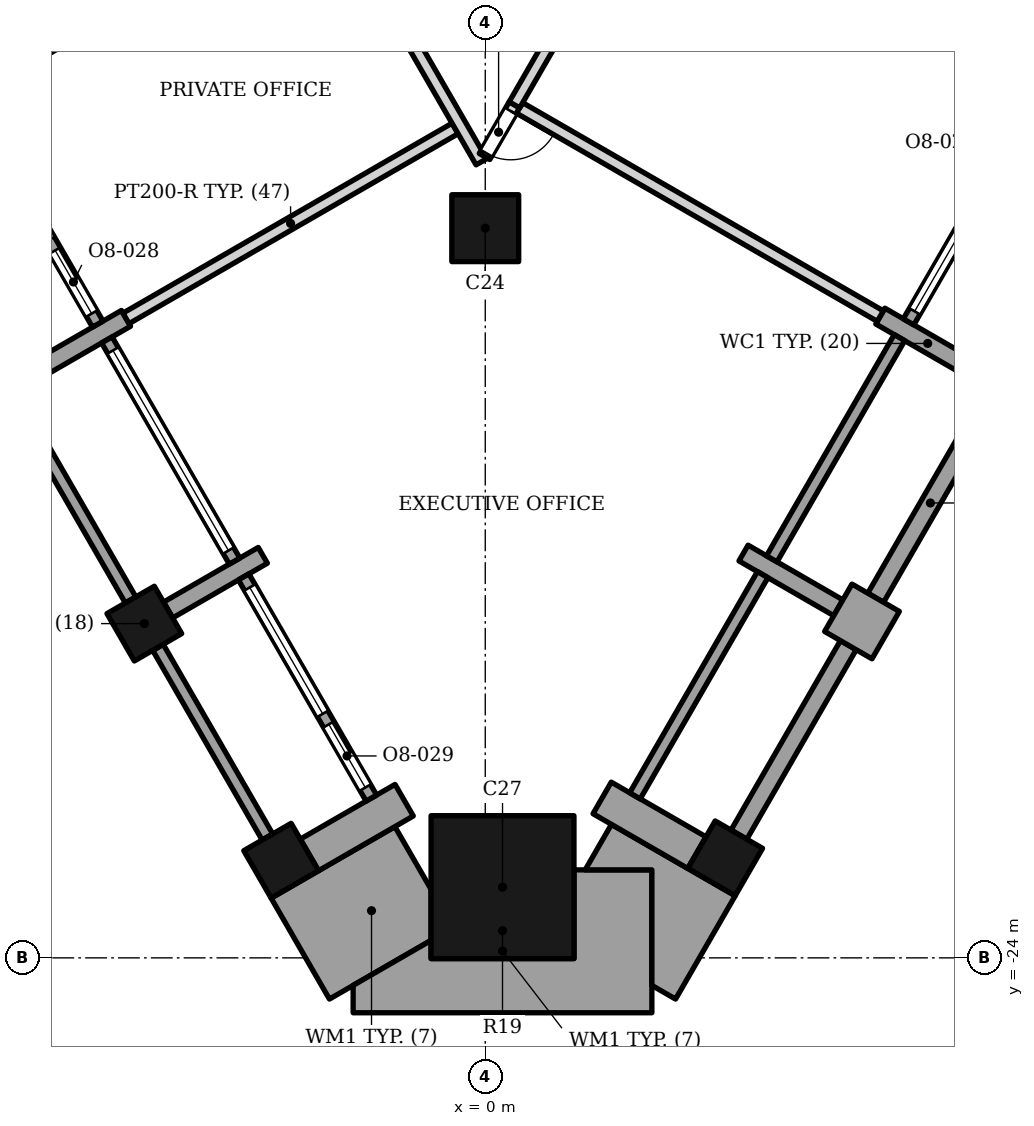
"""IFC4 building model, lengths in metres.
Left out: names, types, materials, properties, quantities, classifications, styles, units other than length and angle.
Written with IfcOpenShell. Run it as: python <this file> out.ifc"""

import sys

from ifc_helpers import new_model, si_unit, direction, frame, frame_2d, origin, origin_2d, place, context, subcontext, project, spatial, polyline, rectangle, outline, extrude, element, fill, save


model = new_model("IFC4")
c1 = context("Model", 3, precision=1e-05, world=origin(), true_north=direction((0.0, 1.0)))
c2 = subcontext(c1, "Body", "Model", "MODEL_VIEW")
j1 = project(units=[si_unit("LENGTHUNIT", "METRE"), si_unit("PLANEANGLEUNIT", "RADIAN")], contexts=[c1])
p1 = place(None, origin())
s1 = spatial("IfcSite", under=j1, at=p1, CompositionType="ELEMENT")
p2 = place(p1, origin())
s2 = spatial("IfcBuilding", under=s1, at=p2, CompositionType="ELEMENT")
p3 = place(p2, frame((0.0, 0.0, 231.5)))
s3 = spatial("IfcBuildingStorey", under=s2, at=p3, CompositionType="ELEMENT", Elevation=231.5)
p4 = place(p3, frame((0.284, -22.837, 0.0), z_axis=(0.0, 0.0, 1.0), x_axis=(0.0, 1.0, 0.0)))
e1 = element("IfcColumn", 1, at=p4, inside=s3, PredefinedType="COLUMN", context=c2, shape_type="SweptSolid", body=[
    extrude(rectangle(XDim=2.35, YDim=2.35, at=origin_2d()), origin(), (0.0, 0.0, 1.0), 3.9),
])
p5 = place(p3, frame((0.0, -12.0, 0.0), z_axis=(0.0, 0.0, 1.0), x_axis=(1.0, 0.0, 0.0)))
e2 = element("IfcColumn", 2, at=p5, inside=s3, PredefinedType="COLUMN", context=c2, shape_type="SweptSolid", body=[
    extrude(rectangle(XDim=1.1, YDim=1.1, at=origin_2d()), origin(), (0.0, 0.0, 1.0), 3.9),
])
for number, where, z_axis, x_axis in (
    (3, (-5.607, -18.503, 0.0), (0.0, 0.0, 1.0), (0.5, -0.866, 0.0)),
    (4, (-3.357, -22.402, 0.0), (0.0, 0.0, 1.0), (0.5, -0.866, 0.0)),
    (5, (3.946, -22.363, 0.0), (0.0, 0.0, 1.0), (0.5, 0.866, 0.0)),
):
    element("IfcColumn", number, at=place(p3, frame(where, z_axis=z_axis, x_axis=x_axis)), inside=s3, PredefinedType="COLUMN", context=c2, shape_type="SweptSolid", body=[
        extrude(rectangle(XDim=0.9, YDim=0.9, at=origin_2d()), origin(), (0.0, 0.0, 1.0), 3.9),
    ])
p6 = place(p3, frame((-7.467, -14.383, 0.0), z_axis=(0.0, 0.0, 1.0), x_axis=(0.865989075817, 0.500062916607, 0.0)))
e6 = element("IfcWall", 6, at=p6, inside=s3, PredefinedType="SOLIDWALL", context=c2, shape_type="SweptSolid", body=[
    extrude(rectangle(XDim=1.8, YDim=0.3, at=frame_2d((0.9, 0.0))), origin(), (0.0, 0.0, 1.0), 3.0),
])
p7 = place(p3, frame((-3.658, -17.38, 0.0), z_axis=(0.0, 0.0, 1.0), x_axis=(-0.866029639064, -0.499992664208, 0.0)))
e7 = element("IfcWall", 7, at=p7, inside=s3, PredefinedType="SOLIDWALL", context=c2, shape_type="SweptSolid", body=[
    extrude(rectangle(XDim=1.799, YDim=0.3, at=frame_2d((0.899, 0.0))), origin(), (0.0, 0.0, 1.0), 3.0),
])
p8 = place(p3, frame((-1.333, -21.407, 0.0), z_axis=(0.0, 0.0, 1.0), x_axis=(-0.866047807691, -0.499961193289, 0.0)))
e8 = element("IfcWall", 8, at=p8, inside=s3, PredefinedType="SOLIDWALL", context=c2, shape_type="SweptSolid", body=[
    extrude(rectangle(XDim=1.8, YDim=0.6, at=frame_2d((0.9, 0.0))), origin(), (0.0, 0.0, 1.0), 3.0),
])
p9 = place(p3, frame((-8.473, -9.941, 0.0), z_axis=(0.0, 0.0, 1.0), x_axis=(0.500027713859, -0.866009402589, 0.0)))
e9 = element("IfcWall", 9, at=p9, inside=s3, PredefinedType="ELEMENTEDWALL", context=c2, shape_type="SweptSolid", body=[
    extrude(rectangle(XDim=4.2, YDim=0.2, at=frame_2d((2.1, 0.0))), origin(), (0.0, 0.0, 1.0), 2.95),
])
p10 = place(p9, frame((0.2, 0.0, 0.45)))
e10 = element("IfcOpeningElement", 10, at=p10, cuts=e9, PredefinedType="OPENING", context=c2, shape_type="SweptSolid", body=[
    extrude(rectangle(XDim=2.4, YDim=2.25, at=frame_2d((1.2, 1.125))), frame((0.0, 0.11, 0.0), z_axis=(0.0, -1.0, 0.0), x_axis=(1.0, 0.0, 0.0)), (0.0, 0.0, 1.0), 0.22),
])
p11 = place(p9, frame((2.8, 0.0, 0.0)))
e11 = element("IfcOpeningElement", 11, at=p11, cuts=e9, PredefinedType="OPENING", context=c2, shape_type="SweptSolid", body=[
    extrude(rectangle(XDim=1.2, YDim=2.7, at=frame_2d((0.6, 1.35))), frame((0.0, 0.11, 0.0), z_axis=(0.0, -1.0, 0.0), x_axis=(1.0, 0.0, 0.0)), (0.0, 0.0, 1.0), 0.22),
])
p12 = place(p3, origin())
e12 = element("IfcWall", 12, at=p12, inside=s3, PredefinedType="SOLIDWALL", context=c2, shape_type="SweptSolid", body=[
    extrude(outline(polyline([(-7.719, -15.048), (-5.919, -18.164), (-5.746, -18.064), (-7.545, -14.948), (-7.719, -15.048)])), origin(), (0.0, 0.0, 1.0), 3.0),
])
p13 = place(p3, frame((-6.223, -13.838, 0.0), z_axis=(0.0, 0.0, 1.0), x_axis=(0.500002543286, -0.866023935413, 0.0)))
e13 = element("IfcWall", 13, at=p13, inside=s3, PredefinedType="ELEMENTEDWALL", context=c2, shape_type="SweptSolid", body=[
    extrude(rectangle(XDim=4.2, YDim=0.2, at=frame_2d((2.1, 0.0))), origin(), (0.0, 0.0, 1.0), 3.0),
])
p14 = place(p13, frame((0.2, 0.0, 0.45)))
e14 = element("IfcOpeningElement", 14, at=p14, cuts=e13, PredefinedType="OPENING", context=c2, shape_type="SweptSolid", body=[
    extrude(rectangle(XDim=3.8, YDim=2.25, at=frame_2d((1.9, 1.125))), frame((0.0, 0.11, 0.0), z_axis=(0.0, -1.0, 0.0), x_axis=(1.0, 0.0, 0.0)), (0.0, 0.0, 1.0), 0.22),
])
p15 = place(p3, frame((-5.382, -18.895, 0.0), z_axis=(0.0, 0.0, 1.0), x_axis=(0.500012057535, -0.866018442252, 0.0)))
e15 = element("IfcWall", 15, at=p15, inside=s3, PredefinedType="SOLIDWALL", context=c2, shape_type="SweptSolid", body=[
    extrude(rectangle(XDim=3.6, YDim=0.2, at=frame_2d((1.8, 0.0))), origin(), (0.0, 0.0, 1.0), 3.0),
])
p16 = place(p3, frame((-3.973, -17.735, 0.0), z_axis=(0.0, 0.0, 1.0), x_axis=(0.500027713859, -0.866009402589, 0.0)))
e16 = element("IfcWall", 16, at=p16, inside=s3, PredefinedType="ELEMENTEDWALL", context=c2, shape_type="SweptSolid", body=[
    extrude(rectangle(XDim=4.2, YDim=0.2, at=frame_2d((2.1, 0.0))), origin(), (0.0, 0.0, 1.0), 3.0),
])
p17 = place(p16, frame((0.2, 0.0, 0.45)))
e17 = element("IfcOpeningElement", 17, at=p17, cuts=e16, PredefinedType="OPENING", context=c2, shape_type="SweptSolid", body=[
    extrude(rectangle(XDim=2.4, YDim=2.25, at=frame_2d((1.2, 1.125))), frame((0.0, 0.11, 0.0), z_axis=(0.0, -1.0, 0.0), x_axis=(1.0, 0.0, 0.0)), (0.0, 0.0, 1.0), 0.22),
])
p18 = place(p16, frame((2.8, 0.0, 0.0)))
e18 = element("IfcOpeningElement", 18, at=p18, cuts=e16, PredefinedType="OPENING", context=c2, shape_type="SweptSolid", body=[
    extrude(rectangle(XDim=1.2, YDim=2.7, at=frame_2d((0.6, 1.35))), frame((0.0, 0.11, 0.0), z_axis=(0.0, -1.0, 0.0), x_axis=(1.0, 0.0, 0.0)), (0.0, 0.0, 1.0), 0.22),
])
p19 = place(p3, frame((3.481, -22.27, 0.0), z_axis=(0.0, 0.0, 1.0), x_axis=(-0.865989075817, 0.500062916607, 0.0)))
e19 = element("IfcWall", 19, at=p19, inside=s3, PredefinedType="SOLIDWALL", context=c2, shape_type="SweptSolid", body=[
    extrude(rectangle(XDim=1.8, YDim=0.6, at=frame_2d((0.9, 0.0))), origin(), (0.0, 0.0, 1.0), 3.0),
])
p20 = place(p3, frame((5.971, -18.857, 0.0), z_axis=(0.0, 0.0, 1.0), x_axis=(0.499902469156, 0.866081705922, 0.0)))
e20 = element("IfcWall", 20, at=p20, inside=s3, PredefinedType="SOLIDWALL", context=c2, shape_type="SweptSolid", body=[
    extrude(rectangle(XDim=0.9, YDim=0.9, at=frame_2d((0.45, 0.0))), origin(), (0.0, 0.0, 1.0), 3.0),
])
for number, where, z_axis, x_axis in (
    (21, (4.248, -17.343, 0.0), (0.0, 0.0, 1.0), (0.866, -0.5, 0.0)),
    (22, (8.056, -14.345, 0.0), (0.0, 0.0, 1.0), (-0.866, 0.5, 0.0)),
):
    element("IfcWall", number, at=place(p3, frame(where, z_axis=z_axis, x_axis=x_axis)), inside=s3, PredefinedType="SOLIDWALL", context=c2, shape_type="SweptSolid", body=[
        extrude(rectangle(XDim=1.8, YDim=0.3, at=frame_2d((0.9, 0.0))), origin(), (0.0, 0.0, 1.0), 3.0),
    ])
p21 = place(p3, frame((4.172, -21.974, 0.0), z_axis=(0.0, 0.0, 1.0), x_axis=(0.499984792966, 0.866034183392, 0.0)))
e23 = element("IfcWall", 23, at=p21, inside=s3, PredefinedType="SOLIDWALL", context=c2, shape_type="SweptSolid", body=[
    extrude(rectangle(XDim=3.598, YDim=0.3, at=frame_2d((1.799, 0.0))), origin(), (0.0, 0.0, 1.0), 3.0),
])
p22 = place(p3, frame((2.462, -21.335, 0.0), z_axis=(0.0, 0.0, 1.0), x_axis=(0.500002543286, 0.866023935413, 0.0)))
e24 = element("IfcWall", 24, at=p22, inside=s3, PredefinedType="ELEMENTEDWALL", context=c2, shape_type="SweptSolid", body=[
    extrude(rectangle(XDim=4.2, YDim=0.2, at=frame_2d((2.1, 0.0))), origin(), (0.0, 0.0, 1.0), 3.0),
])
p23 = place(p3, frame((8.221, -14.961, 0.0), z_axis=(0.0, 0.0, 1.0), x_axis=(-0.50001992892, -0.866013897511, 0.0)))
e25 = element("IfcWall", 25, at=p23, inside=s3, PredefinedType="SOLIDWALL", context=c2, shape_type="SweptSolid", body=[
    extrude(rectangle(XDim=3.599, YDim=0.3, at=frame_2d((1.8, 0.0))), origin(), (0.0, 0.0, 1.0), 3.0),
])
p24 = place(p3, frame((4.712, -17.438, 0.0), z_axis=(0.0, 0.0, 1.0), x_axis=(0.500027713859, 0.866009402589, 0.0)))
e26 = element("IfcWall", 26, at=p24, inside=s3, PredefinedType="ELEMENTEDWALL", context=c2, shape_type="SweptSolid", body=[
    extrude(rectangle(XDim=4.2, YDim=0.2, at=frame_2d((2.1, 0.0))), origin(), (0.0, 0.0, 1.0), 3.0),
])
p25 = place(p3, frame((6.962, -13.541, 0.0), z_axis=(0.0, 0.0, 1.0), x_axis=(0.500027713859, 0.866009402589, 0.0)))
e27 = element("IfcWall", 27, at=p25, inside=s3, PredefinedType="ELEMENTEDWALL", context=c2, shape_type="SweptSolid", body=[
    extrude(rectangle(XDim=4.2, YDim=0.2, at=frame_2d((2.1, 0.0))), origin(), (0.0, 0.0, 1.0), 2.884),
])
p26 = place(p25, frame((0.2, 0.0, 0.45)))
e28 = element("IfcOpeningElement", 28, at=p26, cuts=e27, PredefinedType="OPENING", context=c2, shape_type="SweptSolid", body=[
    extrude(rectangle(XDim=2.4, YDim=2.25, at=frame_2d((1.2, 1.125))), frame((0.0, 0.11, 0.0), z_axis=(0.0, -1.0, 0.0), x_axis=(1.0, 0.0, 0.0)), (0.0, 0.0, 1.0), 0.22),
])
p27 = place(p25, frame((2.8, 0.0, 0.0)))
e29 = element("IfcOpeningElement", 29, at=p27, cuts=e27, PredefinedType="OPENING", context=c2, shape_type="SweptSolid", body=[
    extrude(rectangle(XDim=1.2, YDim=2.7, at=frame_2d((0.6, 1.35))), frame((0.0, 0.11, 0.0), z_axis=(0.0, -1.0, 0.0), x_axis=(1.0, 0.0, 0.0)), (0.0, 0.0, 1.0), 0.22),
])
p28 = place(p3, origin())
e30 = element("IfcWall", 30, at=p28, inside=s3, PredefinedType="SOLIDWALL", context=c2, shape_type="SweptSolid", body=[
    extrude(outline(polyline([(-0.891, -22.874), (-1.487, -21.842), (-3.522, -23.017), (-2.563, -24.678), (-0.891, -23.713), (-0.891, -22.874)])), origin(), (0.0, 0.0, 1.0), 3.0),
])
p29 = place(p3, origin())
e31 = element("IfcWall", 31, at=p29, inside=s3, PredefinedType="SOLIDWALL", context=c2, shape_type="SweptSolid", body=[
    extrude(outline(polyline([(1.459, -24.012), (-0.891, -24.012), (-0.891, -23.713), (-2.173, -24.453), (-2.173, -24.903), (2.74, -24.903), (2.74, -22.553), (1.459, -22.553), (1.459, -24.012)])), origin(), (0.0, 0.0, 1.0), 3.0),
])
p30 = place(p3, origin())
e32 = element("IfcWall", 32, at=p30, inside=s3, PredefinedType="SOLIDWALL", context=c2, shape_type="SweptSolid", body=[
    extrude(outline(polyline([(4.111, -22.979), (2.076, -21.804), (1.644, -22.553), (2.74, -22.553), (2.74, -24.453), (3.13, -24.678), (4.111, -22.979)])), origin(), (0.0, 0.0, 1.0), 3.0),
])
p31 = place(p3, frame((-5.908, -13.483, 0.0), z_axis=(0.0, 0.0, 1.0), x_axis=(0.866160870949, 0.499765290549, 0.0)))
e33 = element("IfcWall", 33, at=p31, inside=s3, PredefinedType="PARTITIONING", context=c2, shape_type="SweptSolid", body=[
    extrude(rectangle(XDim=6.25, YDim=0.2, at=frame_2d((3.125, 0.0))), origin(), (0.0, 0.0, 1.0), 2.742),
])
p32 = place(p3, frame((-8.403, 3.534, 0.0), z_axis=(0.0, 0.0, 1.0), x_axis=(0.499994899308, -0.86602834865, 0.0)))
e34 = element("IfcWall", 34, at=p32, inside=s3, PredefinedType="PARTITIONING", context=c2, shape_type="SweptSolid", body=[
    extrude(rectangle(XDim=16.677, YDim=0.2, at=frame_2d((8.339, 0.0))), origin(), (0.0, 0.0, 1.0), 2.742),
])
p33 = place(p32, frame((6.084, 0.0, 0.0)))
e35 = element("IfcOpeningElement", 35, at=p33, cuts=e34, PredefinedType="OPENING", context=c2, shape_type="SweptSolid", body=[
    extrude(rectangle(XDim=1.8, YDim=2.4, at=frame_2d((0.9, 1.2))), frame((0.0, 0.11, 0.0), z_axis=(0.0, -1.0, 0.0), x_axis=(1.0, 0.0, 0.0)), (0.0, 0.0, 1.0), 0.22),
])
p34 = place(p32, frame((13.285, 0.0, 0.0)))
e36 = element("IfcOpeningElement", 36, at=p34, cuts=e34, PredefinedType="OPENING", context=c2, shape_type="SweptSolid", body=[
    extrude(rectangle(XDim=0.9, YDim=2.1, at=frame_2d((0.45, 1.05))), frame((0.0, 0.11, 0.0), z_axis=(0.0, -1.0, 0.0), x_axis=(1.0, 0.0, 0.0)), (0.0, 0.0, 1.0), 0.22),
])
p35 = place(p32, frame((1.364, 0.0, 0.0)))
e37 = element("IfcOpeningElement", 37, at=p35, cuts=e34, PredefinedType="OPENING", context=c2, shape_type="SweptSolid", body=[
    extrude(rectangle(XDim=0.9, YDim=2.1, at=frame_2d((0.45, 1.05))), frame((0.0, 0.11, 0.0), z_axis=(0.0, -1.0, 0.0), x_axis=(1.0, 0.0, 0.0)), (0.0, 0.0, 1.0), 0.22),
])
p36 = place(p3, frame((-0.012, -10.822, 0.0), z_axis=(0.0, 0.0, 1.0), x_axis=(0.501271486133, 0.865290065348, 0.0)))
e38 = element("IfcWall", 38, at=p36, inside=s3, PredefinedType="PARTITIONING", context=c2, shape_type="SweptSolid", body=[
    extrude(rectangle(XDim=0.982, YDim=0.2, at=frame_2d((0.491, 0.0))), origin(), (0.0, 0.0, 1.0), 2.742),
])
p37 = place(p36, frame((0.062, 0.0, 0.0)))
e39 = element("IfcOpeningElement", 39, at=p37, cuts=e38, PredefinedType="OPENING", context=c2, shape_type="SweptSolid", body=[
    extrude(rectangle(XDim=0.8, YDim=2.1, at=frame_2d((0.4, 1.05))), frame((0.0, 0.11, 0.0), z_axis=(0.0, -1.0, 0.0), x_axis=(1.0, 0.0, 0.0)), (0.0, 0.0, 1.0), 0.22),
])
p38 = place(p3, frame((0.565, -10.022, 0.0), z_axis=(0.0, 0.0, 1.0), x_axis=(0.866127427728, -0.499823247696, 0.0)))
e40 = element("IfcWall", 40, at=p38, inside=s3, PredefinedType="PARTITIONING", context=c2, shape_type="SweptSolid", body=[
    extrude(rectangle(XDim=6.85, YDim=0.2, at=frame_2d((3.425, 0.0))), origin(), (0.0, 0.0, 1.0), 2.742),
])
p39 = place(p3, frame((-8.158, -9.586, 0.0), z_axis=(0.0, 0.0, 1.0), x_axis=(0.866153717883, 0.499777687575, 0.0)))
e41 = element("IfcWall", 41, at=p39, inside=s3, PredefinedType="PARTITIONING", context=c2, shape_type="SweptSolid", body=[
    extrude(rectangle(XDim=6.25, YDim=0.2, at=frame_2d((3.125, 0.0))), origin(), (0.0, 0.0, 1.0), 2.742),
])
p40 = place(p3, frame((0.48, -9.972, 0.0), z_axis=(0.0, 0.0, 1.0), x_axis=(0.499998248741, 0.866026414872, 0.0)))
e42 = element("IfcWall", 42, at=p40, inside=s3, PredefinedType="PARTITIONING", context=c2, shape_type="SweptSolid", body=[
    extrude(rectangle(XDim=15.785, YDim=0.2, at=frame_2d((7.893, 0.0))), origin(), (0.0, 0.0, 1.0), 2.742),
])
p41 = place(p40, frame((5.85, 0.0, 0.0)))
e43 = element("IfcOpeningElement", 43, at=p41, cuts=e42, PredefinedType="OPENING", context=c2, shape_type="SweptSolid", body=[
    extrude(rectangle(XDim=1.8, YDim=2.4, at=frame_2d((0.9, 1.2))), frame((0.0, 0.11, 0.0), z_axis=(0.0, -1.0, 0.0), x_axis=(1.0, 0.0, 0.0)), (0.0, 0.0, 1.0), 0.22),
])
p42 = place(p11, origin())
e44 = element("IfcDoor", 44, at=p42, inside=s3, OperationType="SINGLE_SWING_LEFT", PredefinedType="DOOR", context=c2, shape_type="SweptSolid", body=[
    extrude(rectangle(XDim=1.2, YDim=2.7, at=frame_2d((0.6, 1.35))), frame((0.0, 0.025, 0.0), z_axis=(0.0, -1.0, 0.0), x_axis=(1.0, 0.0, 0.0)), (0.0, 0.0, 1.0), 0.05),
])
fill(e11, e44)
p43 = place(p14, origin())
e45 = element("IfcWindow", 45, at=p43, inside=s3, PartitioningType="SINGLE_PANEL", PredefinedType="WINDOW", context=c2, shape_type="SweptSolid", body=[
    extrude(rectangle(XDim=3.8, YDim=2.25, at=frame_2d((1.9, 1.125))), frame((0.0, 0.03, 0.0), z_axis=(0.0, -1.0, 0.0), x_axis=(1.0, 0.0, 0.0)), (0.0, 0.0, 1.0), 0.06),
])
fill(e14, e45)
p44 = place(p17, origin())
e46 = element("IfcWindow", 46, at=p44, inside=s3, PartitioningType="SINGLE_PANEL", PredefinedType="WINDOW", context=c2, shape_type="SweptSolid", body=[
    extrude(rectangle(XDim=2.4, YDim=2.25, at=frame_2d((1.2, 1.125))), frame((0.0, 0.03, 0.0), z_axis=(0.0, -1.0, 0.0), x_axis=(1.0, 0.0, 0.0)), (0.0, 0.0, 1.0), 0.06),
])
fill(e17, e46)
p45 = place(p18, origin())
e47 = element("IfcDoor", 47, at=p45, inside=s3, OperationType="SINGLE_SWING_LEFT", PredefinedType="DOOR", context=c2, shape_type="SweptSolid", body=[
    extrude(rectangle(XDim=1.2, YDim=2.7, at=frame_2d((0.6, 1.35))), frame((0.0, 0.025, 0.0), z_axis=(0.0, -1.0, 0.0), x_axis=(1.0, 0.0, 0.0)), (0.0, 0.0, 1.0), 0.05),
])
fill(e18, e47)
p46 = place(p26, origin())
e48 = element("IfcWindow", 48, at=p46, inside=s3, PartitioningType="SINGLE_PANEL", PredefinedType="WINDOW", context=c2, shape_type="SweptSolid", body=[
    extrude(rectangle(XDim=2.4, YDim=2.25, at=frame_2d((1.2, 1.125))), frame((0.0, 0.03, 0.0), z_axis=(0.0, -1.0, 0.0), x_axis=(1.0, 0.0, 0.0)), (0.0, 0.0, 1.0), 0.06),
])
fill(e28, e48)
p47 = place(p37, origin())
e49 = element("IfcDoor", 49, at=p47, inside=s3, OperationType="SINGLE_SWING_RIGHT", PredefinedType="DOOR", context=c2, shape_type="SweptSolid", body=[
    extrude(rectangle(XDim=0.8, YDim=2.1, at=frame_2d((0.4, 1.05))), frame((0.0, 0.025, 0.0), z_axis=(0.0, -1.0, 0.0), x_axis=(1.0, 0.0, 0.0)), (0.0, 0.0, 1.0), 0.05),
])
fill(e39, e49)
save(model, sys.argv[1])
